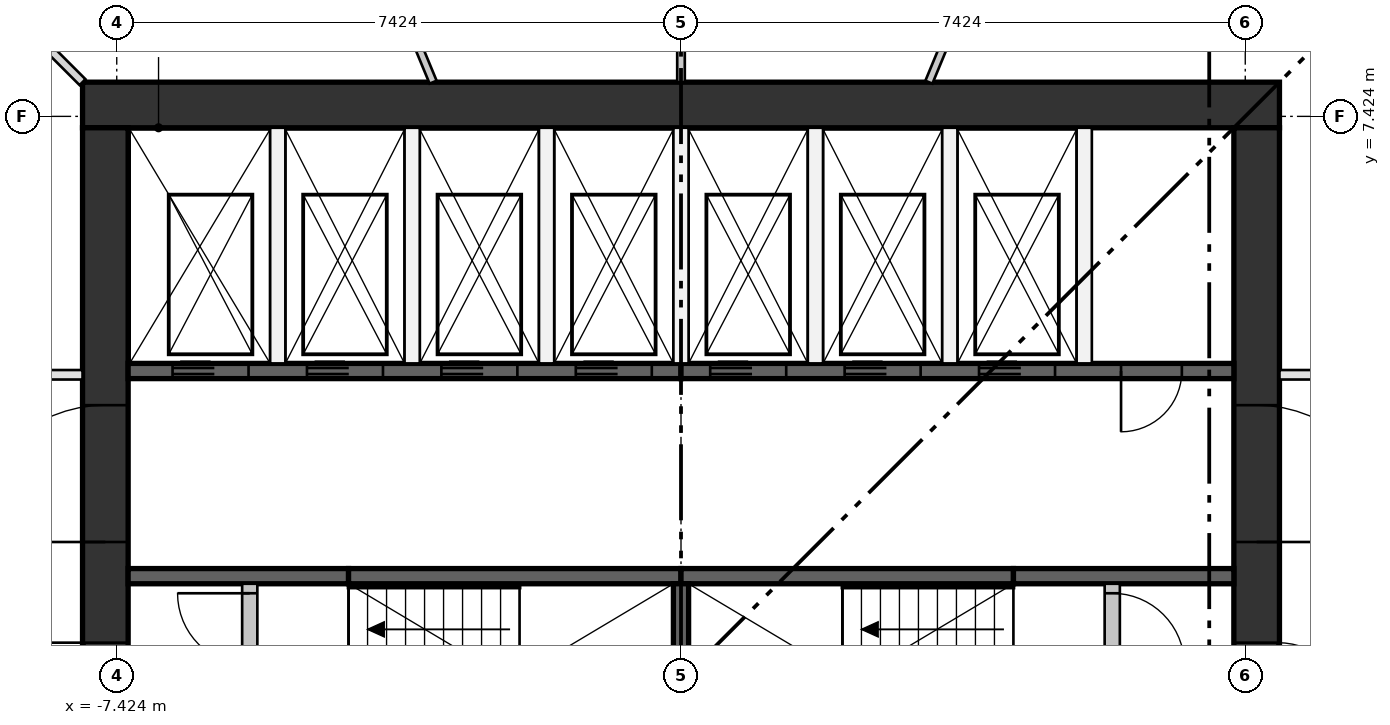
"""IFC4 building model, lengths in metres.
Left out: names, types, materials, properties, quantities, classifications, styles, units other than length and angle.
Written with IfcOpenShell. Run it as: python <this file> out.ifc"""

import sys

from ifc_helpers import new_model, si_unit, direction, frame, frame_2d, origin, place, context, subcontext, project, spatial, rectangle, extrude, element, fill, save


model = new_model("IFC4")
c1 = context("Model", 3, precision=1e-05, world=origin(), true_north=direction((0.0, 1.0)))
c2 = subcontext(c1, "Body", "Model", "MODEL_VIEW")
j1 = project(units=[si_unit("LENGTHUNIT", "METRE"), si_unit("PLANEANGLEUNIT", "RADIAN")], contexts=[c1])
p1 = place(None, origin())
s1 = spatial("IfcSite", under=j1, at=p1, CompositionType="ELEMENT")
p2 = place(p1, origin())
s2 = spatial("IfcBuilding", under=s1, at=p2, CompositionType="ELEMENT")
p3 = place(p2, frame((0.0, 0.0, 120.95)))
s3 = spatial("IfcBuildingStorey", under=s2, at=p3, CompositionType="ELEMENT", Elevation=120.95)
p4 = place(p3, frame((-7.874, 7.574, 0.0), z_axis=(0.0, 0.0, 1.0), x_axis=(1.0, 0.0, 0.0)))
e1 = element("IfcWall", 1, at=p4, inside=s3, PredefinedType="SHEAR", context=c2, shape_type="SweptSolid", body=[
    extrude(rectangle(XDim=15.748, YDim=0.6, at=frame_2d((7.874, 0.0))), origin(), (0.0, 0.0, 1.0), 3.35),
])
p5 = place(p3, frame((-7.574, -7.274, 0.0), z_axis=(0.0, 0.0, 1.0), x_axis=(0.0, 1.0, 0.0)))
e2 = element("IfcWall", 2, at=p5, inside=s3, PredefinedType="SHEAR", context=c2, shape_type="SweptSolid", body=[
    extrude(rectangle(XDim=14.548, YDim=0.6, at=frame_2d((7.274, 0.0))), origin(), (0.0, 0.0, 1.0), 3.35),
])
p6 = place(p5, frame((6.774, 0.0, 0.0)))
e3 = element("IfcOpeningElement", 3, at=p6, cuts=e2, PredefinedType="OPENING", context=c2, shape_type="SweptSolid", body=[
    extrude(rectangle(XDim=1.0, YDim=2.1, at=frame_2d((0.5, 1.05))), frame((0.0, 0.31, 0.0), z_axis=(0.0, -1.0, 0.0), x_axis=(1.0, 0.0, 0.0)), (0.0, 0.0, 1.0), 0.62),
])
p7 = place(p5, frame((3.649, 0.0, 0.0)))
e4 = element("IfcOpeningElement", 4, at=p7, cuts=e2, PredefinedType="OPENING", context=c2, shape_type="SweptSolid", body=[
    extrude(rectangle(XDim=1.8, YDim=2.1, at=frame_2d((0.9, 1.05))), frame((0.0, 0.31, 0.0), z_axis=(0.0, -1.0, 0.0), x_axis=(1.0, 0.0, 0.0)), (0.0, 0.0, 1.0), 0.62),
])
p8 = place(p5, frame((9.098, 0.0, 0.0)))
e5 = element("IfcOpeningElement", 5, at=p8, cuts=e2, PredefinedType="OPENING", context=c2, shape_type="SweptSolid", body=[
    extrude(rectangle(XDim=1.8, YDim=2.1, at=frame_2d((0.9, 1.05))), frame((0.0, 0.31, 0.0), z_axis=(0.0, -1.0, 0.0), x_axis=(1.0, 0.0, 0.0)), (0.0, 0.0, 1.0), 0.62),
])
p9 = place(p3, frame((7.574, -7.274, 0.0), z_axis=(0.0, 0.0, 1.0), x_axis=(0.0, 1.0, 0.0)))
e6 = element("IfcWall", 6, at=p9, inside=s3, PredefinedType="SHEAR", context=c2, shape_type="SweptSolid", body=[
    extrude(rectangle(XDim=14.548, YDim=0.6, at=frame_2d((7.274, 0.0))), origin(), (0.0, 0.0, 1.0), 3.35),
])
p10 = place(p9, frame((6.774, 0.0, 0.0)))
e7 = element("IfcOpeningElement", 7, at=p10, cuts=e6, PredefinedType="OPENING", context=c2, shape_type="SweptSolid", body=[
    extrude(rectangle(XDim=1.0, YDim=2.1, at=frame_2d((0.5, 1.05))), frame((0.0, 0.31, 0.0), z_axis=(0.0, -1.0, 0.0), x_axis=(1.0, 0.0, 0.0)), (0.0, 0.0, 1.0), 0.62),
])
p11 = place(p9, frame((3.649, 0.0, 0.0)))
e8 = element("IfcOpeningElement", 8, at=p11, cuts=e6, PredefinedType="OPENING", context=c2, shape_type="SweptSolid", body=[
    extrude(rectangle(XDim=1.8, YDim=2.1, at=frame_2d((0.9, 1.05))), frame((0.0, 0.31, 0.0), z_axis=(0.0, -1.0, 0.0), x_axis=(1.0, 0.0, 0.0)), (0.0, 0.0, 1.0), 0.62),
])
p12 = place(p9, frame((9.098, 0.0, 0.0)))
e9 = element("IfcOpeningElement", 9, at=p12, cuts=e6, PredefinedType="OPENING", context=c2, shape_type="SweptSolid", body=[
    extrude(rectangle(XDim=1.8, YDim=2.1, at=frame_2d((0.9, 1.05))), frame((0.0, 0.31, 0.0), z_axis=(0.0, -1.0, 0.0), x_axis=(1.0, 0.0, 0.0)), (0.0, 0.0, 1.0), 0.62),
])
p13 = place(p3, frame((-7.274, 4.074, 0.0), z_axis=(0.0, 0.0, 1.0), x_axis=(1.0, 0.0, 0.0)))
e10 = element("IfcWall", 10, at=p13, inside=s3, PredefinedType="SHEAR", context=c2, shape_type="SweptSolid", body=[
    extrude(rectangle(XDim=7.274, YDim=0.2, at=frame_2d((3.637, 0.0))), origin(), (0.0, 0.0, 1.0), 3.0),
])
p14 = place(p13, frame((0.584, 0.0, 0.0)))
e11 = element("IfcOpeningElement", 11, at=p14, cuts=e10, PredefinedType="OPENING", context=c2, shape_type="SweptSolid", body=[
    extrude(rectangle(XDim=1.0, YDim=2.1, at=frame_2d((0.5, 1.05))), frame((0.0, 0.11, 0.0), z_axis=(0.0, -1.0, 0.0), x_axis=(1.0, 0.0, 0.0)), (0.0, 0.0, 1.0), 0.22),
])
p15 = place(p13, frame((2.353, 0.0, 0.0)))
e12 = element("IfcOpeningElement", 12, at=p15, cuts=e10, PredefinedType="OPENING", context=c2, shape_type="SweptSolid", body=[
    extrude(rectangle(XDim=1.0, YDim=2.1, at=frame_2d((0.5, 1.05))), frame((0.0, 0.11, 0.0), z_axis=(0.0, -1.0, 0.0), x_axis=(1.0, 0.0, 0.0)), (0.0, 0.0, 1.0), 0.22),
])
p16 = place(p13, frame((4.121, 0.0, 0.0)))
e13 = element("IfcOpeningElement", 13, at=p16, cuts=e10, PredefinedType="OPENING", context=c2, shape_type="SweptSolid", body=[
    extrude(rectangle(XDim=1.0, YDim=2.1, at=frame_2d((0.5, 1.05))), frame((0.0, 0.11, 0.0), z_axis=(0.0, -1.0, 0.0), x_axis=(1.0, 0.0, 0.0)), (0.0, 0.0, 1.0), 0.22),
])
p17 = place(p13, frame((5.89, 0.0, 0.0)))
e14 = element("IfcOpeningElement", 14, at=p17, cuts=e10, PredefinedType="OPENING", context=c2, shape_type="SweptSolid", body=[
    extrude(rectangle(XDim=1.0, YDim=2.1, at=frame_2d((0.5, 1.05))), frame((0.0, 0.11, 0.0), z_axis=(0.0, -1.0, 0.0), x_axis=(1.0, 0.0, 0.0)), (0.0, 0.0, 1.0), 0.22),
])
p18 = place(p3, frame((0.0, 4.074, 0.0), z_axis=(0.0, 0.0, 1.0), x_axis=(1.0, 0.0, 0.0)))
e15 = element("IfcWall", 15, at=p18, inside=s3, PredefinedType="SHEAR", context=c2, shape_type="SweptSolid", body=[
    extrude(rectangle(XDim=7.274, YDim=0.2, at=frame_2d((3.637, 0.0))), origin(), (0.0, 0.0, 1.0), 3.0),
])
p19 = place(p18, frame((0.384, 0.0, 0.0)))
e16 = element("IfcOpeningElement", 16, at=p19, cuts=e15, PredefinedType="OPENING", context=c2, shape_type="SweptSolid", body=[
    extrude(rectangle(XDim=1.0, YDim=2.1, at=frame_2d((0.5, 1.05))), frame((0.0, 0.11, 0.0), z_axis=(0.0, -1.0, 0.0), x_axis=(1.0, 0.0, 0.0)), (0.0, 0.0, 1.0), 0.22),
])
p20 = place(p18, frame((2.153, 0.0, 0.0)))
e17 = element("IfcOpeningElement", 17, at=p20, cuts=e15, PredefinedType="OPENING", context=c2, shape_type="SweptSolid", body=[
    extrude(rectangle(XDim=1.0, YDim=2.1, at=frame_2d((0.5, 1.05))), frame((0.0, 0.11, 0.0), z_axis=(0.0, -1.0, 0.0), x_axis=(1.0, 0.0, 0.0)), (0.0, 0.0, 1.0), 0.22),
])
p21 = place(p18, frame((3.921, 0.0, 0.0)))
e18 = element("IfcOpeningElement", 18, at=p21, cuts=e15, PredefinedType="OPENING", context=c2, shape_type="SweptSolid", body=[
    extrude(rectangle(XDim=1.0, YDim=2.1, at=frame_2d((0.5, 1.05))), frame((0.0, 0.11, 0.0), z_axis=(0.0, -1.0, 0.0), x_axis=(1.0, 0.0, 0.0)), (0.0, 0.0, 1.0), 0.22),
])
p22 = place(p18, frame((5.79, 0.0, 0.0)))
e19 = element("IfcOpeningElement", 19, at=p22, cuts=e15, PredefinedType="OPENING", context=c2, shape_type="SweptSolid", body=[
    extrude(rectangle(XDim=0.8, YDim=2.1, at=frame_2d((0.4, 1.05))), frame((0.0, 0.11, 0.0), z_axis=(0.0, -1.0, 0.0), x_axis=(1.0, 0.0, 0.0)), (0.0, 0.0, 1.0), 0.22),
])
p23 = place(p3, frame((-7.274, 1.375, 0.0), z_axis=(0.0, 0.0, 1.0), x_axis=(1.0, 0.0, 0.0)))
e20 = element("IfcWall", 20, at=p23, inside=s3, PredefinedType="SHEAR", context=c2, shape_type="SweptSolid", body=[
    extrude(rectangle(XDim=2.9, YDim=0.2, at=frame_2d((1.45, 0.0))), origin(), (0.0, 0.0, 1.0), 3.0),
])
for number, where, z_axis, x_axis in (
    (21, (-4.374, 1.375, 0.0), (0.0, 0.0, 1.0), (1.0, 0.0, 0.0)),
    (22, (0.0, 1.375, 0.0), (0.0, 0.0, 1.0), (1.0, 0.0, 0.0)),
):
    element("IfcWall", number, at=place(p3, frame(where, z_axis=z_axis, x_axis=x_axis)), inside=s3, PredefinedType="SHEAR", context=c2, shape_type="SweptSolid", body=[
        extrude(rectangle(XDim=4.374, YDim=0.2, at=frame_2d((2.187, 0.0))), origin(), (0.0, 0.0, 1.0), 3.0),
    ])
p24 = place(p3, frame((4.374, 1.375, 0.0), z_axis=(0.0, 0.0, 1.0), x_axis=(1.0, 0.0, 0.0)))
e23 = element("IfcWall", 23, at=p24, inside=s3, PredefinedType="SHEAR", context=c2, shape_type="SweptSolid", body=[
    extrude(rectangle(XDim=2.9, YDim=0.2, at=frame_2d((1.45, 0.0))), origin(), (0.0, 0.0, 1.0), 3.0),
])
p25 = place(p3, frame((0.0, -1.275, 0.0), z_axis=(0.0, 0.0, 1.0), x_axis=(0.0, 1.0, 0.0)))
e24 = element("IfcWall", 24, at=p25, inside=s3, PredefinedType="SHEAR", context=c2, shape_type="SweptSolid", body=[
    extrude(rectangle(XDim=2.55, YDim=0.2, at=frame_2d((1.275, 0.0))), origin(), (0.0, 0.0, 1.0), 3.0),
])
for number, where, z_axis, x_axis in (
    (25, (-5.305, 4.174, 0.0), (0.0, 0.0, 1.0), (0.0, 1.0, 0.0)),
    (26, (-3.537, 4.174, 0.0), (0.0, 0.0, 1.0), (0.0, 1.0, 0.0)),
    (27, (-1.769, 4.174, 0.0), (0.0, 0.0, 1.0), (0.0, 1.0, 0.0)),
    (28, (0.0, 4.174, 0.0), (0.0, 0.0, 1.0), (0.0, 1.0, 0.0)),
    (29, (1.769, 4.174, 0.0), (0.0, 0.0, 1.0), (0.0, 1.0, 0.0)),
    (30, (3.537, 4.174, 0.0), (0.0, 0.0, 1.0), (0.0, 1.0, 0.0)),
    (31, (5.305, 4.174, 0.0), (0.0, 0.0, 1.0), (0.0, 1.0, 0.0)),
):
    element("IfcWall", number, at=place(p3, frame(where, z_axis=z_axis, x_axis=x_axis)), inside=s3, PredefinedType="PARTITIONING", context=c2, shape_type="SweptSolid", body=[
        extrude(rectangle(XDim=3.1, YDim=0.2, at=frame_2d((1.55, 0.0))), origin(), (0.0, 0.0, 1.0), 3.0),
    ])
p26 = place(p3, frame((-5.674, -1.275, 0.0), z_axis=(0.0, 0.0, 1.0), x_axis=(0.0, 1.0, 0.0)))
e32 = element("IfcWall", 32, at=p26, inside=s3, PredefinedType="PARTITIONING", context=c2, shape_type="SweptSolid", body=[
    extrude(rectangle(XDim=2.55, YDim=0.2, at=frame_2d((1.275, 0.0))), origin(), (0.0, 0.0, 1.0), 3.0),
])
p27 = place(p26, frame((0.125, 0.0, 0.0)))
e33 = element("IfcOpeningElement", 33, at=p27, cuts=e32, PredefinedType="OPENING", context=c2, shape_type="SweptSolid", body=[
    extrude(rectangle(XDim=0.95, YDim=2.1, at=frame_2d((0.475, 1.05))), frame((0.0, 0.11, 0.0), z_axis=(0.0, -1.0, 0.0), x_axis=(1.0, 0.0, 0.0)), (0.0, 0.0, 1.0), 0.22),
])
p28 = place(p26, frame((1.475, 0.0, 0.0)))
e34 = element("IfcOpeningElement", 34, at=p28, cuts=e32, PredefinedType="OPENING", context=c2, shape_type="SweptSolid", body=[
    extrude(rectangle(XDim=0.95, YDim=2.1, at=frame_2d((0.475, 1.05))), frame((0.0, 0.11, 0.0), z_axis=(0.0, -1.0, 0.0), x_axis=(1.0, 0.0, 0.0)), (0.0, 0.0, 1.0), 0.22),
])
p29 = place(p3, frame((5.674, -1.275, 0.0), z_axis=(0.0, 0.0, 1.0), x_axis=(0.0, 1.0, 0.0)))
e35 = element("IfcWall", 35, at=p29, inside=s3, PredefinedType="PARTITIONING", context=c2, shape_type="SweptSolid", body=[
    extrude(rectangle(XDim=2.55, YDim=0.2, at=frame_2d((1.275, 0.0))), origin(), (0.0, 0.0, 1.0), 3.0),
])
p30 = place(p29, frame((0.125, 0.0, 0.0)))
e36 = element("IfcOpeningElement", 36, at=p30, cuts=e35, PredefinedType="OPENING", context=c2, shape_type="SweptSolid", body=[
    extrude(rectangle(XDim=0.95, YDim=2.1, at=frame_2d((0.475, 1.05))), frame((0.0, 0.11, 0.0), z_axis=(0.0, -1.0, 0.0), x_axis=(1.0, 0.0, 0.0)), (0.0, 0.0, 1.0), 0.22),
])
p31 = place(p29, frame((1.475, 0.0, 0.0)))
e37 = element("IfcOpeningElement", 37, at=p31, cuts=e35, PredefinedType="OPENING", context=c2, shape_type="SweptSolid", body=[
    extrude(rectangle(XDim=0.95, YDim=2.1, at=frame_2d((0.475, 1.05))), frame((0.0, 0.11, 0.0), z_axis=(0.0, -1.0, 0.0), x_axis=(1.0, 0.0, 0.0)), (0.0, 0.0, 1.0), 0.22),
])
p32 = place(p3, frame((7.874, 4.024, 0.0), z_axis=(0.0, 0.0, 1.0), x_axis=(1.0, 0.0, 0.0)))
e38 = element("IfcWall", 38, at=p32, inside=s3, PredefinedType="PARTITIONING", context=c2, shape_type="SweptSolid", body=[
    extrude(rectangle(XDim=5.384, YDim=0.125, at=frame_2d((2.692, 0.0))), origin(), (0.0, 0.0, 1.0), 3.0),
])
p33 = place(p32, frame((1.8, 0.0, 0.0)))
e39 = element("IfcOpeningElement", 39, at=p33, cuts=e38, PredefinedType="OPENING", context=c2, shape_type="SweptSolid", body=[
    extrude(rectangle(XDim=1.8, YDim=2.1, at=frame_2d((0.9, 1.05))), frame((0.0, 0.073, 0.0), z_axis=(0.0, -1.0, 0.0), x_axis=(1.0, 0.0, 0.0)), (0.0, 0.0, 1.0), 0.145),
])
p34 = place(p3, frame((-13.784, 4.024, 0.0), z_axis=(0.0, 0.0, 1.0), x_axis=(1.0, 0.0, 0.0)))
e40 = element("IfcWall", 40, at=p34, inside=s3, PredefinedType="PARTITIONING", context=c2, shape_type="SweptSolid", body=[
    extrude(rectangle(XDim=5.91, YDim=0.125, at=frame_2d((2.955, 0.0))), origin(), (0.0, 0.0, 1.0), 3.0),
])
p35 = place(p34, frame((2.5, 0.0, 0.0)))
e41 = element("IfcOpeningElement", 41, at=p35, cuts=e40, PredefinedType="OPENING", context=c2, shape_type="SweptSolid", body=[
    extrude(rectangle(XDim=1.0, YDim=2.1, at=frame_2d((0.5, 1.05))), frame((0.0, 0.073, 0.0), z_axis=(0.0, -1.0, 0.0), x_axis=(1.0, 0.0, 0.0)), (0.0, 0.0, 1.0), 0.145),
])
p36 = place(p3, frame((3.261, 7.874, 0.0), z_axis=(0.0, 0.0, 1.0), x_axis=(0.382689326263, 0.923877091157, 0.0)))
e42 = element("IfcWall", 42, at=p36, inside=s3, PredefinedType="PARTITIONING", context=c2, shape_type="SweptSolid", body=[
    extrude(rectangle(XDim=6.537, YDim=0.1, at=frame_2d((3.269, 0.0))), origin(), (0.0, 0.0, 1.0), 3.0),
])
p37 = place(p36, frame((2.8, 0.0, 0.0)))
e43 = element("IfcOpeningElement", 43, at=p37, cuts=e42, PredefinedType="OPENING", context=c2, shape_type="SweptSolid", body=[
    extrude(rectangle(XDim=1.0, YDim=2.1, at=frame_2d((0.5, 1.05))), frame((0.0, 0.06, 0.0), z_axis=(0.0, -1.0, 0.0), x_axis=(1.0, 0.0, 0.0)), (0.0, 0.0, 1.0), 0.12),
])
p38 = place(p3, frame((0.0, 7.874, 0.0), z_axis=(0.0, 0.0, 1.0), x_axis=(0.0, 1.0, 0.0)))
e44 = element("IfcWall", 44, at=p38, inside=s3, PredefinedType="PARTITIONING", context=c2, shape_type="SweptSolid", body=[
    extrude(rectangle(XDim=7.186, YDim=0.1, at=frame_2d((3.593, 0.0))), origin(), (0.0, 0.0, 1.0), 3.0),
])
p39 = place(p38, frame((3.1, 0.0, 0.0)))
e45 = element("IfcOpeningElement", 45, at=p39, cuts=e44, PredefinedType="OPENING", context=c2, shape_type="SweptSolid", body=[
    extrude(rectangle(XDim=1.0, YDim=2.1, at=frame_2d((0.5, 1.05))), frame((0.0, 0.06, 0.0), z_axis=(0.0, -1.0, 0.0), x_axis=(1.0, 0.0, 0.0)), (0.0, 0.0, 1.0), 0.12),
])
p40 = place(p3, frame((-3.261, 7.874, 0.0), z_axis=(0.0, 0.0, 1.0), x_axis=(-0.382689326263, 0.923877091157, 0.0)))
e46 = element("IfcWall", 46, at=p40, inside=s3, PredefinedType="PARTITIONING", context=c2, shape_type="SweptSolid", body=[
    extrude(rectangle(XDim=6.537, YDim=0.1, at=frame_2d((3.269, 0.0))), origin(), (0.0, 0.0, 1.0), 3.0),
])
p41 = place(p40, frame((2.8, 0.0, 0.0)))
e47 = element("IfcOpeningElement", 47, at=p41, cuts=e46, PredefinedType="OPENING", context=c2, shape_type="SweptSolid", body=[
    extrude(rectangle(XDim=1.0, YDim=2.1, at=frame_2d((0.5, 1.05))), frame((0.0, 0.06, 0.0), z_axis=(0.0, -1.0, 0.0), x_axis=(1.0, 0.0, 0.0)), (0.0, 0.0, 1.0), 0.12),
])
p42 = place(p3, frame((-7.874, 7.874, 0.0), z_axis=(0.0, 0.0, 1.0), x_axis=(-0.707106781187, 0.707106781187, 0.0)))
e48 = element("IfcWall", 48, at=p42, inside=s3, PredefinedType="PARTITIONING", context=c2, shape_type="SweptSolid", body=[
    extrude(rectangle(XDim=6.794, YDim=0.11, at=frame_2d((3.397, 0.0))), origin(), (0.0, 0.0, 1.0), 3.0),
])
p43 = place(p14, frame((1.0, 0.0, 0.0), z_axis=(0.0, 0.0, 1.0), x_axis=(-1.0, 0.0, 0.0)))
e49 = element("IfcDoor", 49, at=p43, inside=s3, OperationType="DOUBLE_DOOR_SLIDING", PredefinedType="DOOR", context=c2, shape_type="SweptSolid", body=[
    extrude(rectangle(XDim=1.0, YDim=2.1, at=frame_2d((0.5, 1.05))), frame((0.0, 0.025, 0.0), z_axis=(0.0, -1.0, 0.0), x_axis=(1.0, 0.0, 0.0)), (0.0, 0.0, 1.0), 0.05),
])
fill(e11, e49)
p44 = place(p15, frame((1.0, 0.0, 0.0), z_axis=(0.0, 0.0, 1.0), x_axis=(-1.0, 0.0, 0.0)))
e50 = element("IfcDoor", 50, at=p44, inside=s3, OperationType="DOUBLE_DOOR_SLIDING", PredefinedType="DOOR", context=c2, shape_type="SweptSolid", body=[
    extrude(rectangle(XDim=1.0, YDim=2.1, at=frame_2d((0.5, 1.05))), frame((0.0, 0.025, 0.0), z_axis=(0.0, -1.0, 0.0), x_axis=(1.0, 0.0, 0.0)), (0.0, 0.0, 1.0), 0.05),
])
fill(e12, e50)
p45 = place(p16, frame((1.0, 0.0, 0.0), z_axis=(0.0, 0.0, 1.0), x_axis=(-1.0, 0.0, 0.0)))
e51 = element("IfcDoor", 51, at=p45, inside=s3, OperationType="DOUBLE_DOOR_SLIDING", PredefinedType="DOOR", context=c2, shape_type="SweptSolid", body=[
    extrude(rectangle(XDim=1.0, YDim=2.1, at=frame_2d((0.5, 1.05))), frame((0.0, 0.025, 0.0), z_axis=(0.0, -1.0, 0.0), x_axis=(1.0, 0.0, 0.0)), (0.0, 0.0, 1.0), 0.05),
])
fill(e13, e51)
p46 = place(p17, frame((1.0, 0.0, 0.0), z_axis=(0.0, 0.0, 1.0), x_axis=(-1.0, 0.0, 0.0)))
e52 = element("IfcDoor", 52, at=p46, inside=s3, OperationType="DOUBLE_DOOR_SLIDING", PredefinedType="DOOR", context=c2, shape_type="SweptSolid", body=[
    extrude(rectangle(XDim=1.0, YDim=2.1, at=frame_2d((0.5, 1.05))), frame((0.0, 0.025, 0.0), z_axis=(0.0, -1.0, 0.0), x_axis=(1.0, 0.0, 0.0)), (0.0, 0.0, 1.0), 0.05),
])
fill(e14, e52)
p47 = place(p19, frame((1.0, 0.0, 0.0), z_axis=(0.0, 0.0, 1.0), x_axis=(-1.0, 0.0, 0.0)))
e53 = element("IfcDoor", 53, at=p47, inside=s3, OperationType="DOUBLE_DOOR_SLIDING", PredefinedType="DOOR", context=c2, shape_type="SweptSolid", body=[
    extrude(rectangle(XDim=1.0, YDim=2.1, at=frame_2d((0.5, 1.05))), frame((0.0, 0.025, 0.0), z_axis=(0.0, -1.0, 0.0), x_axis=(1.0, 0.0, 0.0)), (0.0, 0.0, 1.0), 0.05),
])
fill(e16, e53)
p48 = place(p20, frame((1.0, 0.0, 0.0), z_axis=(0.0, 0.0, 1.0), x_axis=(-1.0, 0.0, 0.0)))
e54 = element("IfcDoor", 54, at=p48, inside=s3, OperationType="DOUBLE_DOOR_SLIDING", PredefinedType="DOOR", context=c2, shape_type="SweptSolid", body=[
    extrude(rectangle(XDim=1.0, YDim=2.1, at=frame_2d((0.5, 1.05))), frame((0.0, 0.025, 0.0), z_axis=(0.0, -1.0, 0.0), x_axis=(1.0, 0.0, 0.0)), (0.0, 0.0, 1.0), 0.05),
])
fill(e17, e54)
p49 = place(p21, frame((1.0, 0.0, 0.0), z_axis=(0.0, 0.0, 1.0), x_axis=(-1.0, 0.0, 0.0)))
e55 = element("IfcDoor", 55, at=p49, inside=s3, OperationType="DOUBLE_DOOR_SLIDING", PredefinedType="DOOR", context=c2, shape_type="SweptSolid", body=[
    extrude(rectangle(XDim=1.0, YDim=2.1, at=frame_2d((0.5, 1.05))), frame((0.0, 0.025, 0.0), z_axis=(0.0, -1.0, 0.0), x_axis=(1.0, 0.0, 0.0)), (0.0, 0.0, 1.0), 0.05),
])
fill(e18, e55)
p50 = place(p28, origin())
e56 = element("IfcDoor", 56, at=p50, inside=s3, OperationType="SINGLE_SWING_RIGHT", PredefinedType="DOOR", context=c2, shape_type="SweptSolid", body=[
    extrude(rectangle(XDim=0.95, YDim=2.1, at=frame_2d((0.475, 1.05))), frame((0.0, 0.025, 0.0), z_axis=(0.0, -1.0, 0.0), x_axis=(1.0, 0.0, 0.0)), (0.0, 0.0, 1.0), 0.05),
])
fill(e34, e56)
p51 = place(p31, frame((0.95, 0.0, 0.0), z_axis=(0.0, 0.0, 1.0), x_axis=(-1.0, 0.0, 0.0)))
e57 = element("IfcDoor", 57, at=p51, inside=s3, OperationType="SINGLE_SWING_LEFT", PredefinedType="DOOR", context=c2, shape_type="SweptSolid", body=[
    extrude(rectangle(XDim=0.95, YDim=2.1, at=frame_2d((0.475, 1.05))), frame((0.0, 0.025, 0.0), z_axis=(0.0, -1.0, 0.0), x_axis=(1.0, 0.0, 0.0)), (0.0, 0.0, 1.0), 0.05),
])
fill(e37, e57)
p52 = place(p22, frame((0.8, 0.0, 0.0), z_axis=(0.0, 0.0, 1.0), x_axis=(-1.0, 0.0, 0.0)))
e58 = element("IfcDoor", 58, at=p52, inside=s3, OperationType="SINGLE_SWING_LEFT", PredefinedType="DOOR", context=c2, shape_type="SweptSolid", body=[
    extrude(rectangle(XDim=0.8, YDim=2.1, at=frame_2d((0.4, 1.05))), frame((0.0, 0.025, 0.0), z_axis=(0.0, -1.0, 0.0), x_axis=(1.0, 0.0, 0.0)), (0.0, 0.0, 1.0), 0.05),
])
fill(e19, e58)
p53 = place(p6, origin())
e59 = element("IfcDoor", 59, at=p53, inside=s3, OperationType="SINGLE_SWING_RIGHT", PredefinedType="DOOR", context=c2, shape_type="SweptSolid", body=[
    extrude(rectangle(XDim=1.0, YDim=2.1, at=frame_2d((0.5, 1.05))), frame((0.0, 0.3, 0.0), z_axis=(0.0, -1.0, 0.0), x_axis=(1.0, 0.0, 0.0)), (0.0, 0.0, 1.0), 0.05),
])
fill(e3, e59)
p54 = place(p8, origin())
e60 = element("IfcDoor", 60, at=p54, inside=s3, OperationType="DOUBLE_DOOR_SINGLE_SWING", PredefinedType="DOOR", context=c2, shape_type="SweptSolid", body=[
    extrude(rectangle(XDim=1.8, YDim=2.1, at=frame_2d((0.9, 1.05))), frame((0.0, 0.025, 0.0), z_axis=(0.0, -1.0, 0.0), x_axis=(1.0, 0.0, 0.0)), (0.0, 0.0, 1.0), 0.05),
])
fill(e5, e60)
p55 = place(p10, frame((1.0, 0.0, 0.0), z_axis=(0.0, 0.0, 1.0), x_axis=(-1.0, 0.0, 0.0)))
e61 = element("IfcDoor", 61, at=p55, inside=s3, OperationType="SINGLE_SWING_LEFT", PredefinedType="DOOR", context=c2, shape_type="SweptSolid", body=[
    extrude(rectangle(XDim=1.0, YDim=2.1, at=frame_2d((0.5, 1.05))), frame((0.0, 0.3, 0.0), z_axis=(0.0, -1.0, 0.0), x_axis=(1.0, 0.0, 0.0)), (0.0, 0.0, 1.0), 0.05),
])
fill(e7, e61)
p56 = place(p12, frame((1.8, 0.0, 0.0), z_axis=(0.0, 0.0, 1.0), x_axis=(-1.0, 0.0, 0.0)))
e62 = element("IfcDoor", 62, at=p56, inside=s3, OperationType="DOUBLE_DOOR_SINGLE_SWING", PredefinedType="DOOR", context=c2, shape_type="SweptSolid", body=[
    extrude(rectangle(XDim=1.8, YDim=2.1, at=frame_2d((0.9, 1.05))), frame((0.0, 0.025, 0.0), z_axis=(0.0, -1.0, 0.0), x_axis=(1.0, 0.0, 0.0)), (0.0, 0.0, 1.0), 0.05),
])
fill(e9, e62)
save(model, sys.argv[1])
